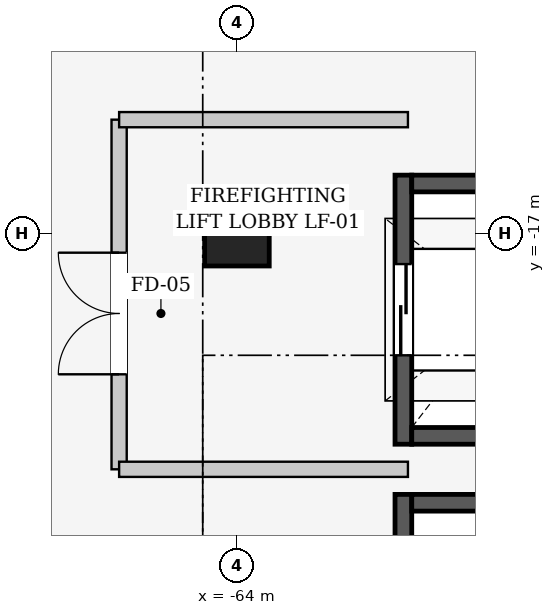
"""IFC4 building model, lengths in metres.
Left out: names, types, materials, properties, quantities, classifications, styles, units other than length and angle.
Written with IfcOpenShell. Run it as: python <this file> out.ifc"""

import sys

from ifc_helpers import new_model, si_unit, direction, frame, frame_2d, origin, origin_2d, place, context, subcontext, project, spatial, rectangle, extrude, element, fill, save


model = new_model("IFC4")
c1 = context("Model", 3, precision=1e-05, world=origin(), true_north=direction((0.0, 1.0)))
c2 = subcontext(c1, "Body", "Model", "MODEL_VIEW")
j1 = project(units=[si_unit("LENGTHUNIT", "METRE"), si_unit("PLANEANGLEUNIT", "RADIAN")], contexts=[c1])
p1 = place(None, origin())
s1 = spatial("IfcSite", under=j1, at=p1, CompositionType="ELEMENT")
p2 = place(p1, origin())
s2 = spatial("IfcBuilding", under=s1, at=p2, CompositionType="ELEMENT")
p3 = place(p2, frame((0.0, 0.0, 16.2)))
s3 = spatial("IfcBuildingStorey", under=s2, at=p3, CompositionType="ELEMENT", Elevation=16.2)
p4 = place(p3, frame((-64.0, -17.0, 0.0), z_axis=(0.0, 0.0, 1.0), x_axis=(1.0, 0.0, 0.0)))
e1 = element("IfcColumn", 1, at=p4, inside=s3, PredefinedType="COLUMN", context=c2, shape_type="SweptSolid", body=[
    extrude(rectangle(XDim=0.85, YDim=0.85, at=origin_2d()), origin(), (0.0, 0.0, 1.0), 4.8),
])
p5 = place(p3, frame((-61.81, -19.77, 0.0), z_axis=(0.0, 0.0, 1.0), x_axis=(0.0, 1.0, 0.0)))
e2 = element("IfcWall", 2, at=p5, inside=s3, PredefinedType="SHEAR", context=c2, shape_type="SweptSolid", body=[
    extrude(rectangle(XDim=3.54, YDim=0.22, at=frame_2d((1.77, 0.0))), origin(), (0.0, 0.0, 1.0), 4.8),
])
p6 = place(p5, frame((1.17, 0.0, 0.0)))
e3 = element("IfcOpeningElement", 3, at=p6, cuts=e2, PredefinedType="OPENING", context=c2, shape_type="SweptSolid", body=[
    extrude(rectangle(XDim=1.2, YDim=2.2, at=frame_2d((0.6, 1.1))), frame((0.0, 0.12, 0.0), z_axis=(0.0, -1.0, 0.0), x_axis=(1.0, 0.0, 0.0)), (0.0, 0.0, 1.0), 0.24),
])
for number, where, z_axis, x_axis in (
    (4, (-61.7, -16.34, 0.0), (0.0, 0.0, 1.0), (1.0, 0.0, 0.0)),
    (5, (-59.3, -19.66, 0.0), (0.0, 0.0, 1.0), (-1.0, 0.0, 0.0)),
):
    element("IfcWall", number, at=place(p3, frame(where, z_axis=z_axis, x_axis=x_axis)), inside=s3, PredefinedType="SHEAR", context=c2, shape_type="SweptSolid", body=[
        extrude(rectangle(XDim=2.4, YDim=0.22, at=frame_2d((1.2, 0.0))), origin(), (0.0, 0.0, 1.0), 4.8),
    ])
p7 = place(p3, frame((-61.81, -23.97, 0.0), z_axis=(0.0, 0.0, 1.0), x_axis=(0.0, 1.0, 0.0)))
e6 = element("IfcWall", 6, at=p7, inside=s3, PredefinedType="SHEAR", context=c2, shape_type="SweptSolid", body=[
    extrude(rectangle(XDim=3.54, YDim=0.22, at=frame_2d((1.77, 0.0))), origin(), (0.0, 0.0, 1.0), 4.8),
])
p8 = place(p7, frame((1.22, 0.0, 0.0)))
e7 = element("IfcOpeningElement", 7, at=p8, cuts=e6, PredefinedType="OPENING", context=c2, shape_type="SweptSolid", body=[
    extrude(rectangle(XDim=1.1, YDim=2.2, at=frame_2d((0.55, 1.1))), frame((0.0, 0.12, 0.0), z_axis=(0.0, -1.0, 0.0), x_axis=(1.0, 0.0, 0.0)), (0.0, 0.0, 1.0), 0.24),
])
p9 = place(p3, frame((-61.7, -20.54, 0.0), z_axis=(0.0, 0.0, 1.0), x_axis=(1.0, 0.0, 0.0)))
e8 = element("IfcWall", 8, at=p9, inside=s3, PredefinedType="SHEAR", context=c2, shape_type="SweptSolid", body=[
    extrude(rectangle(XDim=2.4, YDim=0.22, at=frame_2d((1.2, 0.0))), origin(), (0.0, 0.0, 1.0), 4.8),
])
p10 = place(p3, frame((-65.55, -20.1, 0.0), z_axis=(0.0, 0.0, 1.0), x_axis=(0.0, 1.0, 0.0)))
e9 = element("IfcWall", 9, at=p10, inside=s3, PredefinedType="PARTITIONING", context=c2, shape_type="SweptSolid", body=[
    extrude(rectangle(XDim=4.6, YDim=0.2, at=frame_2d((2.3, 0.0))), origin(), (0.0, 0.0, 1.0), 3.545),
])
p11 = place(p10, frame((1.25, 0.0, 0.0)))
e10 = element("IfcOpeningElement", 10, at=p11, cuts=e9, PredefinedType="OPENING", context=c2, shape_type="SweptSolid", body=[
    extrude(rectangle(XDim=1.6, YDim=2.2, at=frame_2d((0.8, 1.1))), frame((0.0, 0.11, 0.0), z_axis=(0.0, -1.0, 0.0), x_axis=(1.0, 0.0, 0.0)), (0.0, 0.0, 1.0), 0.22),
])
for number, where, z_axis, x_axis in (
    (11, (-65.55, -15.5, 0.0), (0.0, 0.0, 1.0), (1.0, 0.0, 0.0)),
    (12, (-61.75, -20.1, 0.0), (0.0, 0.0, 1.0), (-1.0, 0.0, 0.0)),
):
    element("IfcWall", number, at=place(p3, frame(where, z_axis=z_axis, x_axis=x_axis)), inside=s3, PredefinedType="PARTITIONING", context=c2, shape_type="SweptSolid", body=[
        extrude(rectangle(XDim=3.8, YDim=0.2, at=frame_2d((1.9, 0.0))), origin(), (0.0, 0.0, 1.0), 3.845),
    ])
p12 = place(p6, origin())
e13 = element("IfcDoor", 13, at=p12, inside=s3, OperationType="SLIDING_TO_LEFT", PredefinedType="DOOR", context=c2, shape_type="SweptSolid", body=[
    extrude(rectangle(XDim=1.2, YDim=2.2, at=frame_2d((0.6, 1.1))), frame((0.0, 0.025, 0.0), z_axis=(0.0, -1.0, 0.0), x_axis=(1.0, 0.0, 0.0)), (0.0, 0.0, 1.0), 0.05),
])
fill(e3, e13)
p13 = place(p11, origin())
e14 = element("IfcDoor", 14, at=p13, inside=s3, OperationType="DOUBLE_DOOR_SINGLE_SWING", PredefinedType="DOOR", context=c2, shape_type="SweptSolid", body=[
    extrude(rectangle(XDim=1.6, YDim=2.2, at=frame_2d((0.8, 1.1))), frame((0.0, 0.025, 0.0), z_axis=(0.0, -1.0, 0.0), x_axis=(1.0, 0.0, 0.0)), (0.0, 0.0, 1.0), 0.05),
])
fill(e10, e14)
save(model, sys.argv[1])
